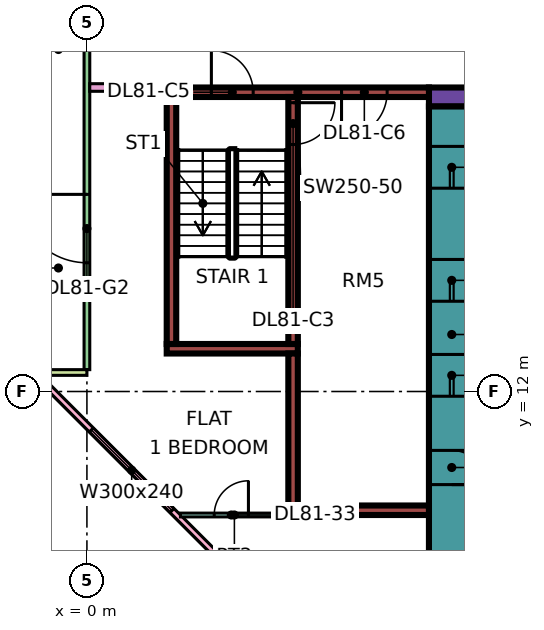
"""IFC4 building model, lengths in metres.
Left out: names, types, materials, properties, quantities, classifications, styles, units other than length and angle.
Written with IfcOpenShell. Run it as: python <this file> out.ifc"""

import sys

from ifc_helpers import new_model, si_unit, direction, frame, frame_2d, origin, place, context, subcontext, project, spatial, rectangle, extrude, element, fill, save


model = new_model("IFC4")
c1 = context("Model", 3, precision=1e-05, world=origin(), true_north=direction((0.0, 1.0)))
c2 = subcontext(c1, "Body", "Model", "MODEL_VIEW")
j1 = project(units=[si_unit("LENGTHUNIT", "METRE"), si_unit("PLANEANGLEUNIT", "RADIAN")], contexts=[c1])
p1 = place(None, origin())
s1 = spatial("IfcSite", under=j1, at=p1, CompositionType="ELEMENT")
p2 = place(p1, origin())
s2 = spatial("IfcBuilding", under=s1, at=p2, CompositionType="ELEMENT")
p3 = place(p2, frame((0.0, 0.0, 350.15)))
s3 = spatial("IfcBuildingStorey", under=s2, at=p3, CompositionType="ELEMENT", Elevation=350.15)
p4 = place(p3, frame((9.0, 19.75, 0.0), z_axis=(0.0, 0.0, 1.0), x_axis=(1.0, 0.0, 0.0)))
e1 = element("IfcWall", 1, at=p4, inside=s3, PredefinedType="SHEAR", context=c2, shape_type="SweptSolid", body=[
    extrude(rectangle(XDim=25.0, YDim=0.5, at=frame_2d((12.5, 0.0))), origin(), (0.0, 0.0, 1.0), 3.75),
])
p5 = place(p4, frame((19.1, 0.0, 0.0)))
e2 = element("IfcOpeningElement", 2, at=p5, cuts=e1, PredefinedType="OPENING", context=c2, shape_type="SweptSolid", body=[
    extrude(rectangle(XDim=1.8, YDim=2.4, at=frame_2d((0.9, 1.2))), frame((0.0, 0.26, 0.0), z_axis=(0.0, -1.0, 0.0), x_axis=(1.0, 0.0, 0.0)), (0.0, 0.0, 1.0), 0.52),
])
p6 = place(p3, frame((9.6, 7.5, 0.0), z_axis=(0.0, 0.0, 1.0), x_axis=(0.0, 1.0, 0.0)))
e3 = element("IfcWall", 3, at=p6, inside=s3, PredefinedType="SHEAR", context=c2, shape_type="SweptSolid", body=[
    extrude(rectangle(XDim=12.0, YDim=1.2, at=frame_2d((6.0, 0.0))), origin(), (0.0, 0.0, 1.0), 3.75),
])
p7 = place(p6, frame((4.375, 0.0, 0.0)))
e4 = element("IfcOpeningElement", 4, at=p7, cuts=e3, PredefinedType="OPENING", context=c2, shape_type="SweptSolid", body=[
    extrude(rectangle(XDim=1.1, YDim=2.2, at=frame_2d((0.55, 1.1))), frame((0.0, 0.61, 0.0), z_axis=(0.0, -1.0, 0.0), x_axis=(1.0, 0.0, 0.0)), (0.0, 0.0, 1.0), 1.22),
])
p8 = place(p6, frame((6.875, 0.0, 0.0)))
e5 = element("IfcOpeningElement", 5, at=p8, cuts=e3, PredefinedType="OPENING", context=c2, shape_type="SweptSolid", body=[
    extrude(rectangle(XDim=1.1, YDim=2.2, at=frame_2d((0.55, 1.1))), frame((0.0, 0.61, 0.0), z_axis=(0.0, -1.0, 0.0), x_axis=(1.0, 0.0, 0.0)), (0.0, 0.0, 1.0), 1.22),
])
p9 = place(p6, frame((9.85, 0.0, 0.0)))
e6 = element("IfcOpeningElement", 6, at=p9, cuts=e3, PredefinedType="OPENING", context=c2, shape_type="SweptSolid", body=[
    extrude(rectangle(XDim=1.1, YDim=2.2, at=frame_2d((0.55, 1.1))), frame((0.0, 0.61, 0.0), z_axis=(0.0, -1.0, 0.0), x_axis=(1.0, 0.0, 0.0)), (0.0, 0.0, 1.0), 1.22),
])
p10 = place(p6, frame((2.05, 0.0, 0.0)))
e7 = element("IfcOpeningElement", 7, at=p10, cuts=e3, PredefinedType="OPENING", context=c2, shape_type="SweptSolid", body=[
    extrude(rectangle(XDim=0.9, YDim=2.1, at=frame_2d((0.45, 1.05))), frame((0.0, 0.61, 0.0), z_axis=(0.0, -1.0, 0.0), x_axis=(1.0, 0.0, 0.0)), (0.0, 0.0, 1.0), 1.22),
])
p11 = place(p3, frame((2.1, 19.875, 0.0), z_axis=(0.0, 0.0, 1.0), x_axis=(1.0, 0.0, 0.0)))
e8 = element("IfcWall", 8, at=p11, inside=s3, PredefinedType="SHEAR", context=c2, shape_type="SweptSolid", body=[
    extrude(rectangle(XDim=6.9, YDim=0.25, at=frame_2d((3.45, 0.0))), origin(), (0.0, 0.0, 1.0), 3.75),
])
p12 = place(p11, frame((1.175, 0.0, 0.0)))
e9 = element("IfcOpeningElement", 9, at=p12, cuts=e8, PredefinedType="OPENING", context=c2, shape_type="SweptSolid", body=[
    extrude(rectangle(XDim=1.1, YDim=2.2, at=frame_2d((0.55, 1.1))), frame((0.0, 0.135, 0.0), z_axis=(0.0, -1.0, 0.0), x_axis=(1.0, 0.0, 0.0)), (0.0, 0.0, 1.0), 0.27),
])
p13 = place(p11, frame((4.6, 0.0, 0.0)))
e10 = element("IfcOpeningElement", 10, at=p13, cuts=e8, PredefinedType="OPENING", context=c2, shape_type="SweptSolid", body=[
    extrude(rectangle(XDim=1.2, YDim=2.2, at=frame_2d((0.6, 1.1))), frame((0.0, 0.135, 0.0), z_axis=(0.0, -1.0, 0.0), x_axis=(1.0, 0.0, 0.0)), (0.0, 0.0, 1.0), 0.27),
])
p14 = place(p3, frame((2.1, 13.125, 0.0), z_axis=(0.0, 0.0, 1.0), x_axis=(1.0, 0.0, 0.0)))
e11 = element("IfcWall", 11, at=p14, inside=s3, PredefinedType="SHEAR", context=c2, shape_type="SweptSolid", body=[
    extrude(rectangle(XDim=3.45, YDim=0.25, at=frame_2d((1.725, 0.0))), origin(), (0.0, 0.0, 1.0), 3.75),
])
p15 = place(p3, frame((2.225, 13.25, 0.0), z_axis=(0.0, 0.0, 1.0), x_axis=(0.0, 1.0, 0.0)))
e12 = element("IfcWall", 12, at=p15, inside=s3, PredefinedType="SHEAR", context=c2, shape_type="SweptSolid", body=[
    extrude(rectangle(XDim=6.5, YDim=0.25, at=frame_2d((3.25, 0.0))), origin(), (0.0, 0.0, 1.0), 3.75),
])
p16 = place(p3, frame((5.425, 13.25, 0.0), z_axis=(0.0, 0.0, 1.0), x_axis=(0.0, 1.0, 0.0)))
e13 = element("IfcWall", 13, at=p16, inside=s3, PredefinedType="SHEAR", context=c2, shape_type="SweptSolid", body=[
    extrude(rectangle(XDim=6.5, YDim=0.25, at=frame_2d((3.25, 0.0))), origin(), (0.0, 0.0, 1.0), 3.75),
])
p17 = place(p16, frame((5.25, 0.0, 0.0)))
e14 = element("IfcOpeningElement", 14, at=p17, cuts=e13, PredefinedType="OPENING", context=c2, shape_type="SweptSolid", body=[
    extrude(rectangle(XDim=1.1, YDim=2.2, at=frame_2d((0.55, 1.1))), frame((0.0, 0.135, 0.0), z_axis=(0.0, -1.0, 0.0), x_axis=(1.0, 0.0, 0.0)), (0.0, 0.0, 1.0), 0.27),
])
p18 = place(p3, frame((5.3, 8.875, 0.0), z_axis=(0.0, 0.0, 1.0), x_axis=(1.0, 0.0, 0.0)))
e15 = element("IfcWall", 15, at=p18, inside=s3, PredefinedType="SHEAR", context=c2, shape_type="SweptSolid", body=[
    extrude(rectangle(XDim=3.7, YDim=0.25, at=frame_2d((1.85, 0.0))), origin(), (0.0, 0.0, 1.0), 3.75),
])
p19 = place(p3, frame((5.425, 9.0, 0.0), z_axis=(0.0, 0.0, 1.0), x_axis=(0.0, 1.0, 0.0)))
e16 = element("IfcWall", 16, at=p19, inside=s3, PredefinedType="SHEAR", context=c2, shape_type="SweptSolid", body=[
    extrude(rectangle(XDim=4.0, YDim=0.25, at=frame_2d((2.0, 0.0))), origin(), (0.0, 0.0, 1.0), 3.75),
])
p20 = place(p3, frame((0.0, 23.925, 0.0), z_axis=(0.0, 0.0, 1.0), x_axis=(0.0, -1.0, 0.0)))
e17 = element("IfcWall", 17, at=p20, inside=s3, PredefinedType="SOLIDWALL", context=c2, shape_type="SweptSolid", body=[
    extrude(rectangle(XDim=11.35, YDim=0.15, at=frame_2d((5.675, 0.0))), origin(), (0.0, 0.0, 1.0), 3.35),
])
p21 = place(p20, frame((6.738, 0.0, 0.0)))
e18 = element("IfcOpeningElement", 18, at=p21, cuts=e17, PredefinedType="OPENING", context=c2, shape_type="SweptSolid", body=[
    extrude(rectangle(XDim=1.8, YDim=2.4, at=frame_2d((0.9, 1.2))), frame((0.0, 0.085, 0.0), z_axis=(0.0, -1.0, 0.0), x_axis=(1.0, 0.0, 0.0)), (0.0, 0.0, 1.0), 0.17),
])
p22 = place(p3, frame((-1.5, 12.5, 0.0), z_axis=(0.0, 0.0, 1.0), x_axis=(1.0, 0.0, 0.0)))
e19 = element("IfcWall", 19, at=p22, inside=s3, PredefinedType="SOLIDWALL", context=c2, shape_type="SweptSolid", body=[
    extrude(rectangle(XDim=1.5, YDim=0.15, at=frame_2d((0.75, 0.0))), origin(), (0.0, 0.0, 1.0), 3.35),
])
p23 = place(p3, frame((-1.447, 12.553, 0.0), z_axis=(0.0, 0.0, 1.0), x_axis=(0.707106781187, -0.707106781187, 0.0)))
e20 = element("IfcWall", 20, at=p23, inside=s3, PredefinedType="SOLIDWALL", context=c2, shape_type="SweptSolid", body=[
    extrude(rectangle(XDim=19.799, YDim=0.15, at=frame_2d((9.899, 0.0))), origin(), (0.0, 0.0, 1.0), 3.35),
])
p24 = place(p23, frame((2.212, 0.0, 0.45)))
e21 = element("IfcOpeningElement", 21, at=p24, cuts=e20, PredefinedType="OPENING", context=c2, shape_type="SweptSolid", body=[
    extrude(rectangle(XDim=3.0, YDim=2.4, at=frame_2d((1.5, 1.2))), frame((0.0, 0.085, 0.0), z_axis=(0.0, -1.0, 0.0), x_axis=(1.0, 0.0, 0.0)), (0.0, 0.0, 1.0), 0.17),
])
p25 = place(p23, frame((10.216, 0.0, 0.45)))
e22 = element("IfcOpeningElement", 22, at=p25, cuts=e20, PredefinedType="OPENING", context=c2, shape_type="SweptSolid", body=[
    extrude(rectangle(XDim=3.0, YDim=2.4, at=frame_2d((1.5, 1.2))), frame((0.0, 0.085, 0.0), z_axis=(0.0, -1.0, 0.0), x_axis=(1.0, 0.0, 0.0)), (0.0, 0.0, 1.0), 0.17),
])
p26 = place(p3, frame((0.074, 20.0, 0.0), z_axis=(0.0, 0.0, 1.0), x_axis=(1.0, 0.0, 0.0)))
e23 = element("IfcWall", 23, at=p26, inside=s3, PredefinedType="PARTITIONING", context=c2, shape_type="SweptSolid", body=[
    extrude(rectangle(XDim=2.026, YDim=0.2, at=frame_2d((1.013, 0.0))), origin(), (0.0, 0.0, 1.0), 3.35),
])
p27 = place(p3, frame((2.461, 8.75, 0.0), z_axis=(0.0, 0.0, 1.0), x_axis=(1.0, 0.0, 0.0)))
e24 = element("IfcWall", 24, at=p27, inside=s3, PredefinedType="PARTITIONING", context=c2, shape_type="SweptSolid", body=[
    extrude(rectangle(XDim=2.839, YDim=0.1, at=frame_2d((1.419, 0.0))), origin(), (0.0, 0.0, 1.0), 3.35),
])
p28 = place(p27, frame((0.889, 0.0, 0.0)))
e25 = element("IfcOpeningElement", 25, at=p28, cuts=e24, PredefinedType="OPENING", context=c2, shape_type="SweptSolid", body=[
    extrude(rectangle(XDim=0.9, YDim=2.1, at=frame_2d((0.45, 1.05))), frame((0.0, 0.06, 0.0), z_axis=(0.0, -1.0, 0.0), x_axis=(1.0, 0.0, 0.0)), (0.0, 0.0, 1.0), 0.12),
])
p29 = place(p21, frame((1.8, 0.0, 0.0), z_axis=(0.0, 0.0, 1.0), x_axis=(-1.0, 0.0, 0.0)))
e26 = element("IfcDoor", 26, at=p29, inside=s3, OperationType="DOUBLE_DOOR_SINGLE_SWING", PredefinedType="DOOR", context=c2, shape_type="SweptSolid", body=[
    extrude(rectangle(XDim=1.8, YDim=2.4, at=frame_2d((0.9, 1.2))), frame((0.0, 0.025, 0.0), z_axis=(0.0, -1.0, 0.0), x_axis=(1.0, 0.0, 0.0)), (0.0, 0.0, 1.0), 0.05),
])
fill(e18, e26)
p30 = place(p24, origin())
e27 = element("IfcWindow", 27, at=p30, inside=s3, PartitioningType="SINGLE_PANEL", PredefinedType="WINDOW", context=c2, shape_type="SweptSolid", body=[
    extrude(rectangle(XDim=3.0, YDim=2.4, at=frame_2d((1.5, 1.2))), frame((0.0, 0.03, 0.0), z_axis=(0.0, -1.0, 0.0), x_axis=(1.0, 0.0, 0.0)), (0.0, 0.0, 1.0), 0.06),
])
fill(e21, e27)
p31 = place(p7, origin())
e28 = element("IfcDoor", 28, at=p31, inside=s3, OperationType="DOUBLE_DOOR_SLIDING", PredefinedType="DOOR", context=c2, shape_type="SweptSolid", body=[
    extrude(rectangle(XDim=1.1, YDim=2.2, at=frame_2d((0.55, 1.1))), frame((0.0, 0.025, 0.0), z_axis=(0.0, -1.0, 0.0), x_axis=(1.0, 0.0, 0.0)), (0.0, 0.0, 1.0), 0.05),
])
fill(e4, e28)
p32 = place(p8, origin())
e29 = element("IfcDoor", 29, at=p32, inside=s3, OperationType="DOUBLE_DOOR_SLIDING", PredefinedType="DOOR", context=c2, shape_type="SweptSolid", body=[
    extrude(rectangle(XDim=1.1, YDim=2.2, at=frame_2d((0.55, 1.1))), frame((0.0, 0.025, 0.0), z_axis=(0.0, -1.0, 0.0), x_axis=(1.0, 0.0, 0.0)), (0.0, 0.0, 1.0), 0.05),
])
fill(e5, e29)
p33 = place(p9, origin())
e30 = element("IfcDoor", 30, at=p33, inside=s3, OperationType="DOUBLE_DOOR_SLIDING", PredefinedType="DOOR", context=c2, shape_type="SweptSolid", body=[
    extrude(rectangle(XDim=1.1, YDim=2.2, at=frame_2d((0.55, 1.1))), frame((0.0, 0.025, 0.0), z_axis=(0.0, -1.0, 0.0), x_axis=(1.0, 0.0, 0.0)), (0.0, 0.0, 1.0), 0.05),
])
fill(e6, e30)
p34 = place(p17, origin())
e31 = element("IfcDoor", 31, at=p34, inside=s3, OperationType="SINGLE_SWING_RIGHT", PredefinedType="DOOR", context=c2, shape_type="SweptSolid", body=[
    extrude(rectangle(XDim=1.1, YDim=2.2, at=frame_2d((0.55, 1.1))), frame((0.0, 0.025, 0.0), z_axis=(0.0, -1.0, 0.0), x_axis=(1.0, 0.0, 0.0)), (0.0, 0.0, 1.0), 0.05),
])
fill(e14, e31)
p35 = place(p10, frame((0.9, 0.0, 0.0), z_axis=(0.0, 0.0, 1.0), x_axis=(-1.0, 0.0, 0.0)))
e32 = element("IfcDoor", 32, at=p35, inside=s3, OperationType="SINGLE_SWING_LEFT", PredefinedType="DOOR", context=c2, shape_type="SweptSolid", body=[
    extrude(rectangle(XDim=0.9, YDim=2.1, at=frame_2d((0.45, 1.05))), frame((0.0, 0.025, 0.0), z_axis=(0.0, -1.0, 0.0), x_axis=(1.0, 0.0, 0.0)), (0.0, 0.0, 1.0), 0.05),
])
fill(e7, e32)
p36 = place(p12, origin())
e33 = element("IfcDoor", 33, at=p36, inside=s3, OperationType="SINGLE_SWING_LEFT", PredefinedType="DOOR", context=c2, shape_type="SweptSolid", body=[
    extrude(rectangle(XDim=1.1, YDim=2.2, at=frame_2d((0.55, 1.1))), frame((0.0, 0.025, 0.0), z_axis=(0.0, -1.0, 0.0), x_axis=(1.0, 0.0, 0.0)), (0.0, 0.0, 1.0), 0.05),
])
fill(e9, e33)
p37 = place(p13, frame((1.2, 0.0, 0.0), z_axis=(0.0, 0.0, 1.0), x_axis=(-1.0, 0.0, 0.0)))
e34 = element("IfcDoor", 34, at=p37, inside=s3, OperationType="SINGLE_SWING_LEFT", PredefinedType="DOOR", context=c2, shape_type="SweptSolid", body=[
    extrude(rectangle(XDim=1.2, YDim=2.2, at=frame_2d((0.6, 1.1))), frame((0.0, 0.025, 0.0), z_axis=(0.0, -1.0, 0.0), x_axis=(1.0, 0.0, 0.0)), (0.0, 0.0, 1.0), 0.05),
])
fill(e10, e34)
p38 = place(p28, frame((0.9, 0.0, 0.0), z_axis=(0.0, 0.0, 1.0), x_axis=(-1.0, 0.0, 0.0)))
e35 = element("IfcDoor", 35, at=p38, inside=s3, OperationType="SINGLE_SWING_RIGHT", PredefinedType="DOOR", context=c2, shape_type="SweptSolid", body=[
    extrude(rectangle(XDim=0.9, YDim=2.1, at=frame_2d((0.45, 1.05))), frame((0.0, 0.025, 0.0), z_axis=(0.0, -1.0, 0.0), x_axis=(1.0, 0.0, 0.0)), (0.0, 0.0, 1.0), 0.05),
])
fill(e25, e35)
save(model, sys.argv[1])
